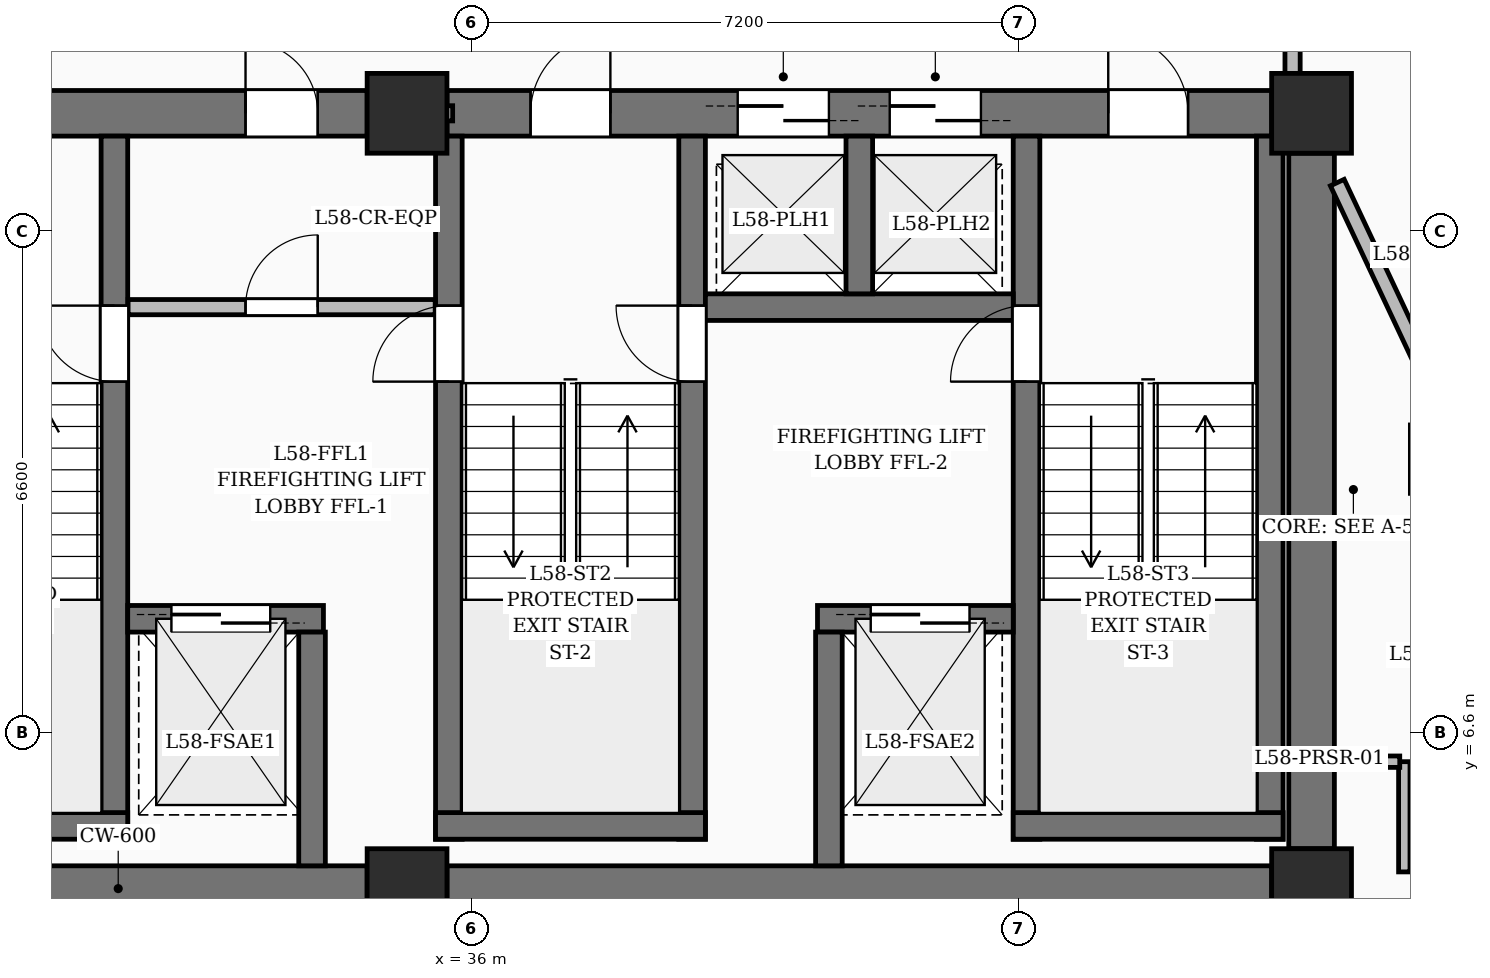
"""IFC4 building model, lengths in metres.
Left out: names, types, materials, properties, quantities, classifications, styles, units other than length and angle.
Written with IfcOpenShell. Run it as: python <this file> out.ifc"""

import sys

from ifc_helpers import new_model, si_unit, direction, frame, frame_2d, origin, origin_2d, place, context, subcontext, project, spatial, rectangle, extrude, element, fill, save


model = new_model("IFC4")
c1 = context("Model", 3, precision=1e-05, world=origin(), true_north=direction((0.0, 1.0)))
c2 = subcontext(c1, "Body", "Model", "MODEL_VIEW")
j1 = project(units=[si_unit("LENGTHUNIT", "METRE"), si_unit("PLANEANGLEUNIT", "RADIAN")], contexts=[c1])
p1 = place(None, origin())
s1 = spatial("IfcSite", under=j1, at=p1, CompositionType="ELEMENT")
p2 = place(p1, origin())
s2 = spatial("IfcBuilding", under=s1, at=p2, CompositionType="ELEMENT")
p3 = place(p2, frame((0.0, 0.0, 225.75)))
s3 = spatial("IfcBuildingStorey", under=s2, at=p3, CompositionType="ELEMENT", Elevation=225.75)
for number, where, z_axis, x_axis in (
    (1, (35.15, 4.55, 0.0), (0.0, 0.0, 1.0), (1.0, 0.0, 0.0)),
    (2, (47.05, 4.55, 0.0), (0.0, 0.0, 1.0), (1.0, 0.0, 0.0)),
    (3, (35.15, 14.75, 0.0), (0.0, 0.0, 1.0), (1.0, 0.0, 0.0)),
    (4, (47.05, 14.75, 0.0), (0.0, 0.0, 1.0), (1.0, 0.0, 0.0)),
):
    element("IfcColumn", number, at=place(p3, frame(where, z_axis=z_axis, x_axis=x_axis)), inside=s3, PredefinedType="COLUMN", context=c2, shape_type="SweptSolid", body=[
        extrude(rectangle(XDim=1.05, YDim=1.05, at=origin_2d()), origin(), (0.0, 0.0, 1.0), 3.75),
    ])
p4 = place(p3, frame((28.075, 4.55, 0.0), z_axis=(0.0, 0.0, 1.0), x_axis=(1.0, 0.0, 0.0)))
e5 = element("IfcWall", 5, at=p4, inside=s3, PredefinedType="SHEAR", context=c2, shape_type="SweptSolid", body=[
    extrude(rectangle(XDim=6.55, YDim=0.6, at=frame_2d((3.275, 0.0))), origin(), (0.0, 0.0, 1.0), 3.75),
])
p5 = place(p3, frame((35.675, 4.55, 0.0), z_axis=(0.0, 0.0, 1.0), x_axis=(1.0, 0.0, 0.0)))
e6 = element("IfcWall", 6, at=p5, inside=s3, PredefinedType="SHEAR", context=c2, shape_type="SweptSolid", body=[
    extrude(rectangle(XDim=10.85, YDim=0.6, at=frame_2d((5.425, 0.0))), origin(), (0.0, 0.0, 1.0), 3.75),
])
p6 = place(p3, frame((28.075, 14.75, 0.0), z_axis=(0.0, 0.0, 1.0), x_axis=(1.0, 0.0, 0.0)))
e7 = element("IfcWall", 7, at=p6, inside=s3, PredefinedType="SHEAR", context=c2, shape_type="SweptSolid", body=[
    extrude(rectangle(XDim=6.55, YDim=0.6, at=frame_2d((3.275, 0.0))), origin(), (0.0, 0.0, 1.0), 3.75),
])
p7 = place(p6, frame((1.1, 0.0, 0.0)))
e8 = element("IfcOpeningElement", 8, at=p7, cuts=e7, PredefinedType="OPENING", context=c2, shape_type="SweptSolid", body=[
    extrude(rectangle(XDim=1.05, YDim=2.15, at=frame_2d((0.525, 1.075))), frame((0.0, 0.31, 0.0), z_axis=(0.0, -1.0, 0.0), x_axis=(1.0, 0.0, 0.0)), (0.0, 0.0, 1.0), 0.62),
])
p8 = place(p6, frame((4.95, 0.0, 0.0)))
e9 = element("IfcOpeningElement", 9, at=p8, cuts=e7, PredefinedType="OPENING", context=c2, shape_type="SweptSolid", body=[
    extrude(rectangle(XDim=0.95, YDim=2.15, at=frame_2d((0.475, 1.075))), frame((0.0, 0.31, 0.0), z_axis=(0.0, -1.0, 0.0), x_axis=(1.0, 0.0, 0.0)), (0.0, 0.0, 1.0), 0.62),
])
p9 = place(p3, frame((35.675, 14.75, 0.0), z_axis=(0.0, 0.0, 1.0), x_axis=(1.0, 0.0, 0.0)))
e10 = element("IfcWall", 10, at=p9, inside=s3, PredefinedType="SHEAR", context=c2, shape_type="SweptSolid", body=[
    extrude(rectangle(XDim=10.85, YDim=0.6, at=frame_2d((5.425, 0.0))), origin(), (0.0, 0.0, 1.0), 3.75),
])
p10 = place(p9, frame((1.1, 0.0, 0.0)))
e11 = element("IfcOpeningElement", 11, at=p10, cuts=e10, PredefinedType="OPENING", context=c2, shape_type="SweptSolid", body=[
    extrude(rectangle(XDim=1.05, YDim=2.15, at=frame_2d((0.525, 1.075))), frame((0.0, 0.31, 0.0), z_axis=(0.0, -1.0, 0.0), x_axis=(1.0, 0.0, 0.0)), (0.0, 0.0, 1.0), 0.62),
])
p11 = place(p9, frame((8.7, 0.0, 0.0)))
e12 = element("IfcOpeningElement", 12, at=p11, cuts=e10, PredefinedType="OPENING", context=c2, shape_type="SweptSolid", body=[
    extrude(rectangle(XDim=1.05, YDim=2.15, at=frame_2d((0.525, 1.075))), frame((0.0, 0.31, 0.0), z_axis=(0.0, -1.0, 0.0), x_axis=(1.0, 0.0, 0.0)), (0.0, 0.0, 1.0), 0.62),
])
p12 = place(p9, frame((3.825, 0.0, 0.0)))
e13 = element("IfcOpeningElement", 13, at=p12, cuts=e10, PredefinedType="OPENING", context=c2, shape_type="SweptSolid", body=[
    extrude(rectangle(XDim=1.2, YDim=2.2, at=frame_2d((0.6, 1.1))), frame((0.0, 0.31, 0.0), z_axis=(0.0, -1.0, 0.0), x_axis=(1.0, 0.0, 0.0)), (0.0, 0.0, 1.0), 0.62),
])
p13 = place(p9, frame((5.825, 0.0, 0.0)))
e14 = element("IfcOpeningElement", 14, at=p13, cuts=e10, PredefinedType="OPENING", context=c2, shape_type="SweptSolid", body=[
    extrude(rectangle(XDim=1.2, YDim=2.2, at=frame_2d((0.6, 1.1))), frame((0.0, 0.31, 0.0), z_axis=(0.0, -1.0, 0.0), x_axis=(1.0, 0.0, 0.0)), (0.0, 0.0, 1.0), 0.62),
])
p14 = place(p3, frame((47.05, 5.075, 0.0), z_axis=(0.0, 0.0, 1.0), x_axis=(0.0, 1.0, 0.0)))
e15 = element("IfcWall", 15, at=p14, inside=s3, PredefinedType="SHEAR", context=c2, shape_type="SweptSolid", body=[
    extrude(rectangle(XDim=9.15, YDim=0.6, at=frame_2d((4.575, 0.0))), origin(), (0.0, 0.0, 1.0), 3.75),
])
p15 = place(p3, frame((31.3, 5.2, 0.0), z_axis=(0.0, 0.0, 1.0), x_axis=(0.0, 1.0, 0.0)))
e16 = element("IfcWall", 16, at=p15, inside=s3, PredefinedType="SOLIDWALL", context=c2, shape_type="SweptSolid", body=[
    extrude(rectangle(XDim=9.25, YDim=0.35, at=frame_2d((4.625, 0.0))), origin(), (0.0, 0.0, 1.0), 3.75),
])
p16 = place(p15, frame((6.02, 0.0, 0.0)))
e17 = element("IfcOpeningElement", 17, at=p16, cuts=e16, PredefinedType="OPENING", context=c2, shape_type="SweptSolid", body=[
    extrude(rectangle(XDim=1.0, YDim=2.15, at=frame_2d((0.5, 1.075))), frame((0.0, 0.185, 0.0), z_axis=(0.0, -1.0, 0.0), x_axis=(1.0, 0.0, 0.0)), (0.0, 0.0, 1.0), 0.37),
])
p17 = place(p3, frame((27.925, 5.375, 0.0), z_axis=(0.0, 0.0, 1.0), x_axis=(1.0, 0.0, 0.0)))
e18 = element("IfcWall", 18, at=p17, inside=s3, PredefinedType="SOLIDWALL", context=c2, shape_type="SweptSolid", body=[
    extrude(rectangle(XDim=3.55, YDim=0.35, at=frame_2d((1.775, 0.0))), origin(), (0.0, 0.0, 1.0), 3.75),
])
p18 = place(p3, frame((35.7, 5.2, 0.0), z_axis=(0.0, 0.0, 1.0), x_axis=(0.0, 1.0, 0.0)))
e19 = element("IfcWall", 19, at=p18, inside=s3, PredefinedType="SOLIDWALL", context=c2, shape_type="SweptSolid", body=[
    extrude(rectangle(XDim=9.25, YDim=0.35, at=frame_2d((4.625, 0.0))), origin(), (0.0, 0.0, 1.0), 3.75),
])
p19 = place(p18, frame((6.02, 0.0, 0.0)))
e20 = element("IfcOpeningElement", 20, at=p19, cuts=e19, PredefinedType="OPENING", context=c2, shape_type="SweptSolid", body=[
    extrude(rectangle(XDim=1.0, YDim=2.15, at=frame_2d((0.5, 1.075))), frame((0.0, 0.185, 0.0), z_axis=(0.0, -1.0, 0.0), x_axis=(1.0, 0.0, 0.0)), (0.0, 0.0, 1.0), 0.37),
])
p20 = place(p3, frame((38.9, 5.2, 0.0), z_axis=(0.0, 0.0, 1.0), x_axis=(0.0, 1.0, 0.0)))
e21 = element("IfcWall", 21, at=p20, inside=s3, PredefinedType="SOLIDWALL", context=c2, shape_type="SweptSolid", body=[
    extrude(rectangle(XDim=9.25, YDim=0.35, at=frame_2d((4.625, 0.0))), origin(), (0.0, 0.0, 1.0), 3.75),
])
p21 = place(p20, frame((6.02, 0.0, 0.0)))
e22 = element("IfcOpeningElement", 22, at=p21, cuts=e21, PredefinedType="OPENING", context=c2, shape_type="SweptSolid", body=[
    extrude(rectangle(XDim=1.0, YDim=2.15, at=frame_2d((0.5, 1.075))), frame((0.0, 0.185, 0.0), z_axis=(0.0, -1.0, 0.0), x_axis=(1.0, 0.0, 0.0)), (0.0, 0.0, 1.0), 0.37),
])
p22 = place(p3, frame((35.525, 5.375, 0.0), z_axis=(0.0, 0.0, 1.0), x_axis=(1.0, 0.0, 0.0)))
e23 = element("IfcWall", 23, at=p22, inside=s3, PredefinedType="SOLIDWALL", context=c2, shape_type="SweptSolid", body=[
    extrude(rectangle(XDim=3.55, YDim=0.35, at=frame_2d((1.775, 0.0))), origin(), (0.0, 0.0, 1.0), 3.75),
])
p23 = place(p3, frame((43.3, 5.2, 0.0), z_axis=(0.0, 0.0, 1.0), x_axis=(0.0, 1.0, 0.0)))
e24 = element("IfcWall", 24, at=p23, inside=s3, PredefinedType="SOLIDWALL", context=c2, shape_type="SweptSolid", body=[
    extrude(rectangle(XDim=9.25, YDim=0.35, at=frame_2d((4.625, 0.0))), origin(), (0.0, 0.0, 1.0), 3.75),
])
p24 = place(p23, frame((6.02, 0.0, 0.0)))
e25 = element("IfcOpeningElement", 25, at=p24, cuts=e24, PredefinedType="OPENING", context=c2, shape_type="SweptSolid", body=[
    extrude(rectangle(XDim=1.0, YDim=2.15, at=frame_2d((0.5, 1.075))), frame((0.0, 0.185, 0.0), z_axis=(0.0, -1.0, 0.0), x_axis=(1.0, 0.0, 0.0)), (0.0, 0.0, 1.0), 0.37),
])
p25 = place(p3, frame((46.5, 5.2, 0.0), z_axis=(0.0, 0.0, 1.0), x_axis=(0.0, 1.0, 0.0)))
e26 = element("IfcWall", 26, at=p25, inside=s3, PredefinedType="SOLIDWALL", context=c2, shape_type="SweptSolid", body=[
    extrude(rectangle(XDim=9.25, YDim=0.35, at=frame_2d((4.625, 0.0))), origin(), (0.0, 0.0, 1.0), 3.75),
])
p26 = place(p3, frame((43.125, 5.375, 0.0), z_axis=(0.0, 0.0, 1.0), x_axis=(1.0, 0.0, 0.0)))
e27 = element("IfcWall", 27, at=p26, inside=s3, PredefinedType="SOLIDWALL", context=c2, shape_type="SweptSolid", body=[
    extrude(rectangle(XDim=3.55, YDim=0.35, at=frame_2d((1.775, 0.0))), origin(), (0.0, 0.0, 1.0), 3.75),
])
p27 = place(p3, frame((31.475, 8.1, 0.0), z_axis=(0.0, 0.0, 1.0), x_axis=(1.0, 0.0, 0.0)))
e28 = element("IfcWall", 28, at=p27, inside=s3, PredefinedType="SOLIDWALL", context=c2, shape_type="SweptSolid", body=[
    extrude(rectangle(XDim=2.575, YDim=0.35, at=frame_2d((1.288, 0.0))), origin(), (0.0, 0.0, 1.0), 3.75),
])
p28 = place(p27, frame((0.575, 0.0, 0.0)))
e29 = element("IfcOpeningElement", 29, at=p28, cuts=e28, PredefinedType="OPENING", context=c2, shape_type="SweptSolid", body=[
    extrude(rectangle(XDim=1.3, YDim=2.25, at=frame_2d((0.65, 1.125))), frame((0.0, 0.185, 0.0), z_axis=(0.0, -1.0, 0.0), x_axis=(1.0, 0.0, 0.0)), (0.0, 0.0, 1.0), 0.37),
])
p29 = place(p3, frame((40.55, 8.1, 0.0), z_axis=(0.0, 0.0, 1.0), x_axis=(1.0, 0.0, 0.0)))
e30 = element("IfcWall", 30, at=p29, inside=s3, PredefinedType="SOLIDWALL", context=c2, shape_type="SweptSolid", body=[
    extrude(rectangle(XDim=2.575, YDim=0.35, at=frame_2d((1.288, 0.0))), origin(), (0.0, 0.0, 1.0), 3.75),
])
p30 = place(p29, frame((0.7, 0.0, 0.0)))
e31 = element("IfcOpeningElement", 31, at=p30, cuts=e30, PredefinedType="OPENING", context=c2, shape_type="SweptSolid", body=[
    extrude(rectangle(XDim=1.3, YDim=2.25, at=frame_2d((0.65, 1.125))), frame((0.0, 0.185, 0.0), z_axis=(0.0, -1.0, 0.0), x_axis=(1.0, 0.0, 0.0)), (0.0, 0.0, 1.0), 0.37),
])
for number, where, z_axis, x_axis in (
    (32, (33.9, 4.85, 0.0), (0.0, 0.0, 1.0), (0.0, 1.0, 0.0)),
    (33, (40.7, 4.85, 0.0), (0.0, 0.0, 1.0), (0.0, 1.0, 0.0)),
):
    element("IfcWall", number, at=place(p3, frame(where, z_axis=z_axis, x_axis=x_axis)), inside=s3, PredefinedType="SOLIDWALL", context=c2, shape_type="SweptSolid", body=[
        extrude(rectangle(XDim=3.075, YDim=0.35, at=frame_2d((1.538, 0.0))), origin(), (0.0, 0.0, 1.0), 3.75),
    ])
p31 = place(p3, frame((39.075, 12.2, 0.0), z_axis=(0.0, 0.0, 1.0), x_axis=(1.0, 0.0, 0.0)))
e34 = element("IfcWall", 34, at=p31, inside=s3, PredefinedType="SOLIDWALL", context=c2, shape_type="SweptSolid", body=[
    extrude(rectangle(XDim=4.05, YDim=0.35, at=frame_2d((2.025, 0.0))), origin(), (0.0, 0.0, 1.0), 3.75),
])
p32 = place(p3, frame((41.1, 12.375, 0.0), z_axis=(0.0, 0.0, 1.0), x_axis=(0.0, 1.0, 0.0)))
e35 = element("IfcWall", 35, at=p32, inside=s3, PredefinedType="SOLIDWALL", context=c2, shape_type="SweptSolid", body=[
    extrude(rectangle(XDim=2.075, YDim=0.35, at=frame_2d((1.038, 0.0))), origin(), (0.0, 0.0, 1.0), 3.75),
])
p33 = place(p3, frame((34.72, 14.75, 0.0), z_axis=(0.0, 0.0, 1.0), x_axis=(1.0, 0.0, 0.0)))
e36 = element("IfcWall", 36, at=p33, inside=s3, PredefinedType="PARTITIONING", context=c2, shape_type="SweptSolid", body=[
    extrude(rectangle(XDim=1.03, YDim=0.2, at=frame_2d((0.515, 0.0))), origin(), (0.0, 0.0, 1.0), 2.685),
])
p34 = place(p3, frame((31.48, 12.2, 0.0), z_axis=(0.0, 0.0, 1.0), x_axis=(1.0, 0.0, 0.0)))
e37 = element("IfcWall", 37, at=p34, inside=s3, PredefinedType="PARTITIONING", context=c2, shape_type="SweptSolid", body=[
    extrude(rectangle(XDim=4.04, YDim=0.2, at=frame_2d((2.02, 0.0))), origin(), (0.0, 0.0, 1.0), 3.5),
])
p35 = place(p34, frame((1.545, 0.0, 0.0)))
e38 = element("IfcOpeningElement", 38, at=p35, cuts=e37, PredefinedType="OPENING", context=c2, shape_type="SweptSolid", body=[
    extrude(rectangle(XDim=0.95, YDim=2.15, at=frame_2d((0.475, 1.075))), frame((0.0, 0.11, 0.0), z_axis=(0.0, -1.0, 0.0), x_axis=(1.0, 0.0, 0.0)), (0.0, 0.0, 1.0), 0.22),
])
p36 = place(p3, frame((46.8, 15.05, 0.0), z_axis=(0.0, 0.0, 1.0), x_axis=(0.0, 1.0, 0.0)))
e39 = element("IfcWall", 39, at=p36, inside=s3, PredefinedType="PARTITIONING", context=c2, shape_type="SweptSolid", body=[
    extrude(rectangle(XDim=1.7, YDim=0.2, at=frame_2d((0.85, 0.0))), origin(), (0.0, 0.0, 1.0), 2.685),
])
p37 = place(p3, frame((48.27, 6.22, 0.0), z_axis=(0.0, 0.0, 1.0), x_axis=(0.0, -1.0, 0.0)))
e40 = element("IfcWall", 40, at=p37, inside=s3, PredefinedType="PARTITIONING", context=c2, shape_type="SweptSolid", body=[
    extrude(rectangle(XDim=1.45, YDim=0.15, at=frame_2d((0.725, 0.0))), origin(), (0.0, 0.0, 1.0), 3.5),
])
p38 = place(p3, frame((47.35, 6.22, 0.0), z_axis=(0.0, 0.0, 1.0), x_axis=(1.0, 0.0, 0.0)))
e41 = element("IfcWall", 41, at=p38, inside=s3, PredefinedType="PARTITIONING", context=c2, shape_type="SweptSolid", body=[
    extrude(rectangle(XDim=0.86, YDim=0.15, at=frame_2d((0.43, 0.0))), origin(), (0.0, 0.0, 1.0), 2.685),
])
p39 = place(p3, frame((50.97, 6.22, 0.0), z_axis=(0.0, 0.0, 1.0), x_axis=(-0.425460425006, 0.904977031064, 0.0)))
e42 = element("IfcWall", 42, at=p39, inside=s3, PredefinedType="PARTITIONING", context=c2, shape_type="SweptSolid", body=[
    extrude(rectangle(XDim=8.419, YDim=0.2, at=frame_2d((4.209, 0.0))), origin(), (0.0, 0.0, 1.0), 1.27),
])
p40 = place(p10, origin())
e43 = element("IfcDoor", 43, at=p40, inside=s3, OperationType="SINGLE_SWING_RIGHT", PredefinedType="DOOR", context=c2, shape_type="SweptSolid", body=[
    extrude(rectangle(XDim=1.05, YDim=2.15, at=frame_2d((0.525, 1.075))), frame((0.0, 0.025, 0.0), z_axis=(0.0, -1.0, 0.0), x_axis=(1.0, 0.0, 0.0)), (0.0, 0.0, 1.0), 0.05),
])
fill(e11, e43)
p41 = place(p11, origin())
e44 = element("IfcDoor", 44, at=p41, inside=s3, OperationType="SINGLE_SWING_LEFT", PredefinedType="DOOR", context=c2, shape_type="SweptSolid", body=[
    extrude(rectangle(XDim=1.05, YDim=2.15, at=frame_2d((0.525, 1.075))), frame((0.0, 0.025, 0.0), z_axis=(0.0, -1.0, 0.0), x_axis=(1.0, 0.0, 0.0)), (0.0, 0.0, 1.0), 0.05),
])
fill(e12, e44)
p42 = place(p16, origin())
e45 = element("IfcDoor", 45, at=p42, inside=s3, OperationType="SINGLE_SWING_RIGHT", PredefinedType="DOOR", context=c2, shape_type="SweptSolid", body=[
    extrude(rectangle(XDim=1.0, YDim=2.15, at=frame_2d((0.5, 1.075))), frame((0.0, 0.025, 0.0), z_axis=(0.0, -1.0, 0.0), x_axis=(1.0, 0.0, 0.0)), (0.0, 0.0, 1.0), 0.05),
])
fill(e17, e45)
p43 = place(p19, origin())
e46 = element("IfcDoor", 46, at=p43, inside=s3, OperationType="SINGLE_SWING_LEFT", PredefinedType="DOOR", context=c2, shape_type="SweptSolid", body=[
    extrude(rectangle(XDim=1.0, YDim=2.15, at=frame_2d((0.5, 1.075))), frame((0.0, 0.025, 0.0), z_axis=(0.0, -1.0, 0.0), x_axis=(1.0, 0.0, 0.0)), (0.0, 0.0, 1.0), 0.05),
])
fill(e20, e46)
p44 = place(p21, origin())
e47 = element("IfcDoor", 47, at=p44, inside=s3, OperationType="SINGLE_SWING_RIGHT", PredefinedType="DOOR", context=c2, shape_type="SweptSolid", body=[
    extrude(rectangle(XDim=1.0, YDim=2.15, at=frame_2d((0.5, 1.075))), frame((0.0, 0.025, 0.0), z_axis=(0.0, -1.0, 0.0), x_axis=(1.0, 0.0, 0.0)), (0.0, 0.0, 1.0), 0.05),
])
fill(e22, e47)
p45 = place(p24, origin())
e48 = element("IfcDoor", 48, at=p45, inside=s3, OperationType="SINGLE_SWING_LEFT", PredefinedType="DOOR", context=c2, shape_type="SweptSolid", body=[
    extrude(rectangle(XDim=1.0, YDim=2.15, at=frame_2d((0.5, 1.075))), frame((0.0, 0.025, 0.0), z_axis=(0.0, -1.0, 0.0), x_axis=(1.0, 0.0, 0.0)), (0.0, 0.0, 1.0), 0.05),
])
fill(e25, e48)
p46 = place(p28, origin())
e49 = element("IfcDoor", 49, at=p46, inside=s3, OperationType="DOUBLE_DOOR_SLIDING", PredefinedType="DOOR", context=c2, shape_type="SweptSolid", body=[
    extrude(rectangle(XDim=1.3, YDim=2.25, at=frame_2d((0.65, 1.125))), frame((0.0, 0.025, 0.0), z_axis=(0.0, -1.0, 0.0), x_axis=(1.0, 0.0, 0.0)), (0.0, 0.0, 1.0), 0.05),
])
fill(e29, e49)
p47 = place(p30, origin())
e50 = element("IfcDoor", 50, at=p47, inside=s3, OperationType="DOUBLE_DOOR_SLIDING", PredefinedType="DOOR", context=c2, shape_type="SweptSolid", body=[
    extrude(rectangle(XDim=1.3, YDim=2.25, at=frame_2d((0.65, 1.125))), frame((0.0, 0.025, 0.0), z_axis=(0.0, -1.0, 0.0), x_axis=(1.0, 0.0, 0.0)), (0.0, 0.0, 1.0), 0.05),
])
fill(e31, e50)
p48 = place(p12, origin())
e51 = element("IfcDoor", 51, at=p48, inside=s3, OperationType="DOUBLE_DOOR_SLIDING", PredefinedType="DOOR", context=c2, shape_type="SweptSolid", body=[
    extrude(rectangle(XDim=1.2, YDim=2.2, at=frame_2d((0.6, 1.1))), frame((0.0, 0.025, 0.0), z_axis=(0.0, -1.0, 0.0), x_axis=(1.0, 0.0, 0.0)), (0.0, 0.0, 1.0), 0.05),
])
fill(e13, e51)
p49 = place(p13, origin())
e52 = element("IfcDoor", 52, at=p49, inside=s3, OperationType="DOUBLE_DOOR_SLIDING", PredefinedType="DOOR", context=c2, shape_type="SweptSolid", body=[
    extrude(rectangle(XDim=1.2, YDim=2.2, at=frame_2d((0.6, 1.1))), frame((0.0, 0.025, 0.0), z_axis=(0.0, -1.0, 0.0), x_axis=(1.0, 0.0, 0.0)), (0.0, 0.0, 1.0), 0.05),
])
fill(e14, e52)
p50 = place(p35, origin())
e53 = element("IfcDoor", 53, at=p50, inside=s3, OperationType="SINGLE_SWING_RIGHT", PredefinedType="DOOR", context=c2, shape_type="SweptSolid", body=[
    extrude(rectangle(XDim=0.95, YDim=2.15, at=frame_2d((0.475, 1.075))), frame((0.0, 0.025, 0.0), z_axis=(0.0, -1.0, 0.0), x_axis=(1.0, 0.0, 0.0)), (0.0, 0.0, 1.0), 0.05),
])
fill(e38, e53)
p51 = place(p8, origin())
e54 = element("IfcDoor", 54, at=p51, inside=s3, OperationType="SINGLE_SWING_LEFT", PredefinedType="DOOR", context=c2, shape_type="SweptSolid", body=[
    extrude(rectangle(XDim=0.95, YDim=2.15, at=frame_2d((0.475, 1.075))), frame((0.0, 0.025, 0.0), z_axis=(0.0, -1.0, 0.0), x_axis=(1.0, 0.0, 0.0)), (0.0, 0.0, 1.0), 0.05),
])
fill(e9, e54)
save(model, sys.argv[1])
